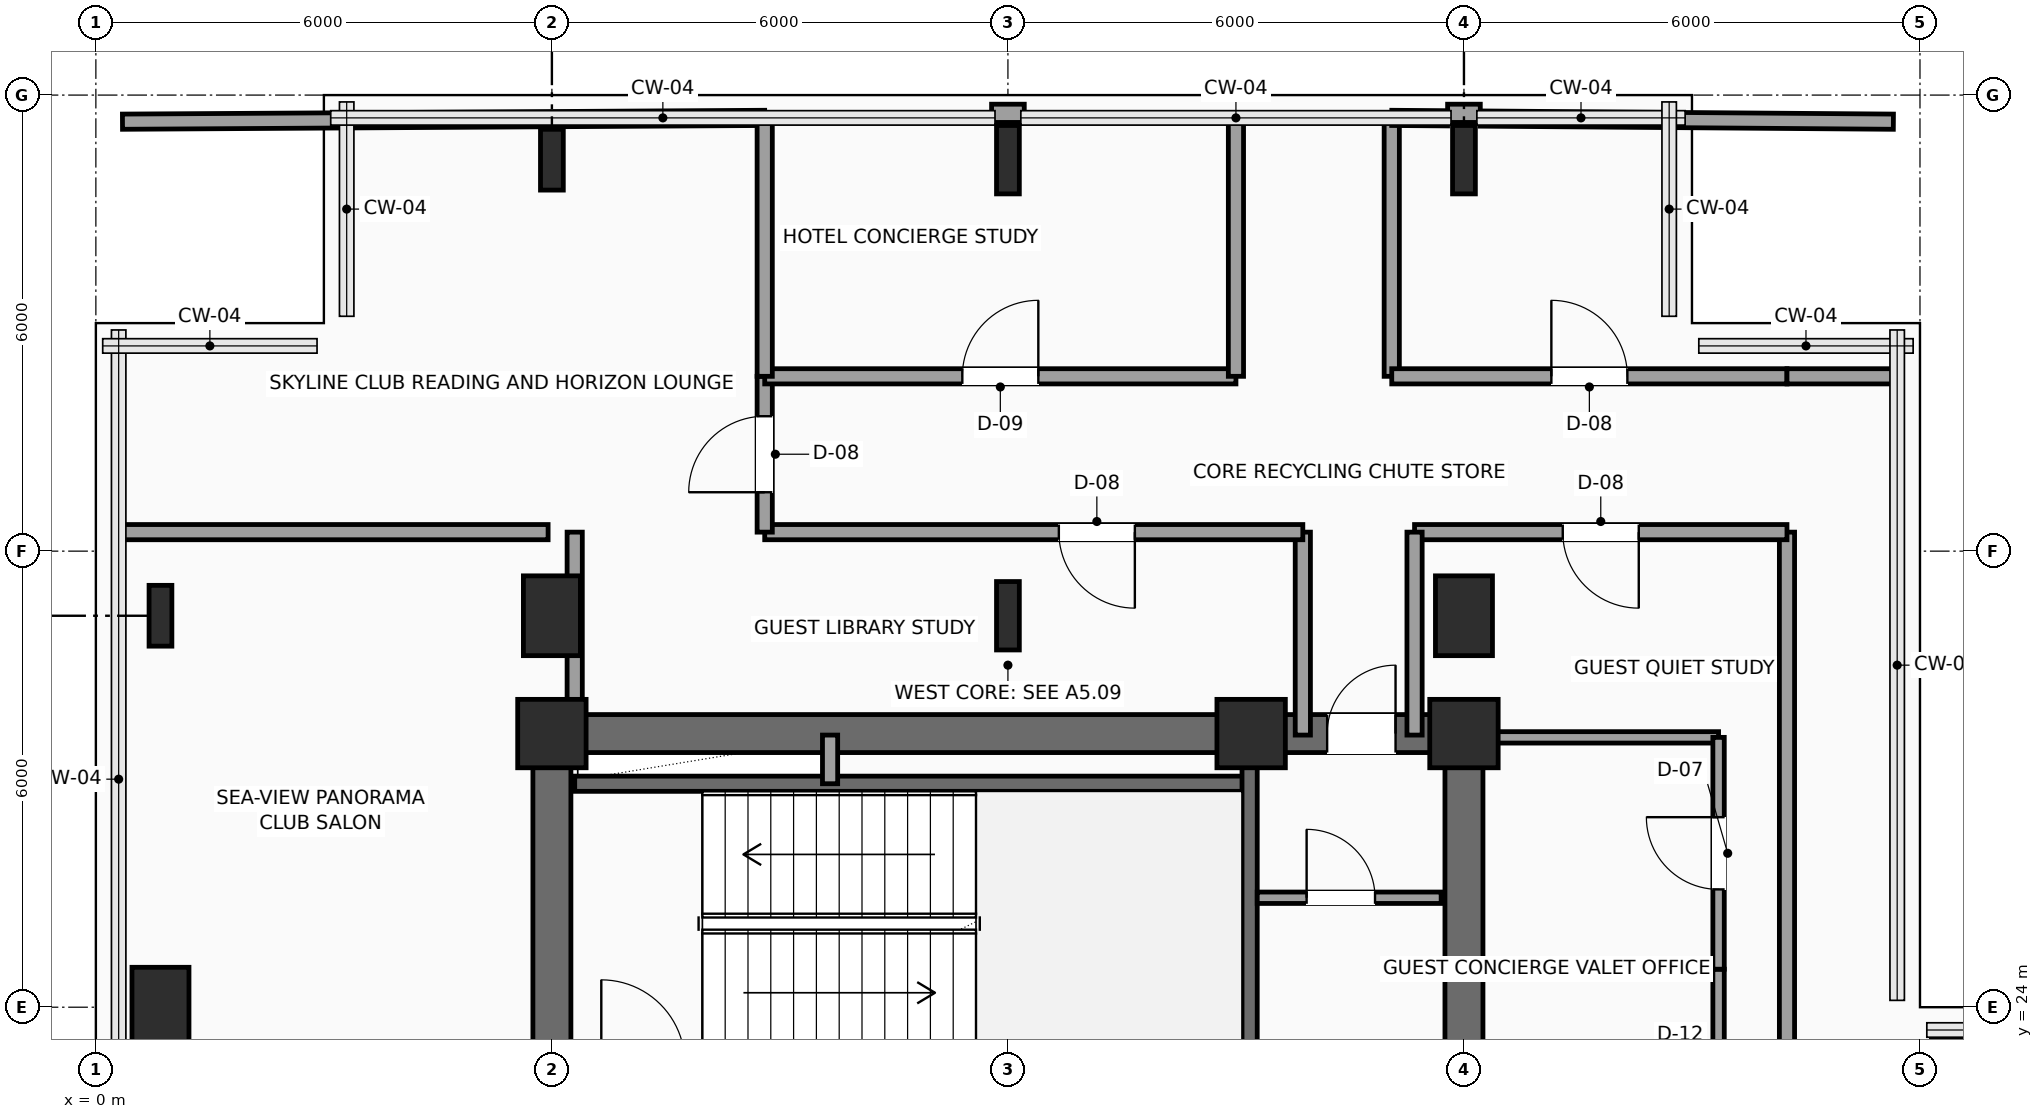
"""IFC4 building model, lengths in metres.
Left out: names, types, materials, properties, quantities, classifications, styles, units other than length and angle.
Written with IfcOpenShell. Run it as: python <this file> out.ifc"""

import sys

from ifc_helpers import new_model, si_unit, direction, frame, frame_2d, origin, origin_2d, place, context, subcontext, project, spatial, rectangle, i_section, extrude, element, fill, save


model = new_model("IFC4")
c1 = context("Model", 3, precision=1e-05, world=origin(), true_north=direction((0.0, 1.0)))
c2 = subcontext(c1, "Body", "Model", "MODEL_VIEW")
j1 = project(units=[si_unit("LENGTHUNIT", "METRE"), si_unit("PLANEANGLEUNIT", "RADIAN")], contexts=[c1])
p1 = place(None, origin())
s1 = spatial("IfcSite", under=j1, at=p1, CompositionType="ELEMENT")
p2 = place(p1, origin())
s2 = spatial("IfcBuilding", under=s1, at=p2, CompositionType="ELEMENT")
p3 = place(p2, frame((0.0, 0.0, 172.95)))
s3 = spatial("IfcBuildingStorey", under=s2, at=p3, CompositionType="ELEMENT", Elevation=172.95)
for number, where, z_axis, x_axis in (
    (1, (6.0, 27.6, 0.0), (0.0, 0.0, 1.0), (1.0, 0.0, 0.0)),
    (2, (15.2, 27.6, 0.0), (0.0, 0.0, 1.0), (1.0, 0.0, 0.0)),
    (3, (18.0, 27.6, 0.0), (0.0, 0.0, 1.0), (1.0, 0.0, 0.0)),
):
    element("IfcColumn", number, at=place(p3, frame(where, z_axis=z_axis, x_axis=x_axis)), inside=s3, PredefinedType="COLUMN", context=c2, shape_type="SweptSolid", body=[
        extrude(rectangle(XDim=0.9, YDim=0.9, at=origin_2d()), origin(), (0.0, 0.0, 1.0), 3.75),
    ])
p4 = place(p3, frame((0.85, 24.0, 0.0), z_axis=(0.0, 0.0, 1.0), x_axis=(1.0, 0.0, 0.0)))
e4 = element("IfcColumn", 4, at=p4, inside=s3, PredefinedType="COLUMN", context=c2, shape_type="SweptSolid", body=[
    extrude(rectangle(XDim=0.75, YDim=1.05, at=origin_2d()), origin(), (0.0, 0.0, 1.0), 3.75),
])
p5 = place(p3, frame((0.85, 29.15, 0.0), z_axis=(0.0, 0.0, 1.0), x_axis=(1.0, 0.0, 0.0)))
e5 = element("IfcColumn", 5, at=p5, inside=s3, PredefinedType="COLUMN", context=c2, shape_type="SweptSolid", body=[
    extrude(i_section(OverallWidth=0.3, OverallDepth=0.8, WebThickness=0.018, FlangeThickness=0.033, FilletRadius=0.03, at=origin_2d()), origin(), (0.0, 0.0, 1.0), 3.75),
])
p6 = place(p3, frame((6.0, 29.15, 0.0), z_axis=(0.0, 0.0, 1.0), x_axis=(1.0, 0.0, 0.0)))
e6 = element("IfcColumn", 6, at=p6, inside=s3, PredefinedType="COLUMN", context=c2, shape_type="SweptSolid", body=[
    extrude(rectangle(XDim=0.75, YDim=1.05, at=origin_2d()), origin(), (0.0, 0.0, 1.0), 3.75),
])
p7 = place(p3, frame((6.0, 35.15, 0.0), z_axis=(0.0, 0.0, 1.0), x_axis=(1.0, 0.0, 0.0)))
e7 = element("IfcColumn", 7, at=p7, inside=s3, PredefinedType="COLUMN", context=c2, shape_type="SweptSolid", body=[
    extrude(i_section(OverallWidth=0.3, OverallDepth=0.8, WebThickness=0.018, FlangeThickness=0.033, FilletRadius=0.03, at=origin_2d()), origin(), (0.0, 0.0, 1.0), 3.75),
])
for number, where, z_axis, x_axis in (
    (8, (12.0, 29.15, 0.0), (0.0, 0.0, 1.0), (1.0, 0.0, 0.0)),
    (9, (12.0, 35.15, 0.0), (0.0, 0.0, 1.0), (1.0, 0.0, 0.0)),
):
    element("IfcColumn", number, at=place(p3, frame(where, z_axis=z_axis, x_axis=x_axis)), inside=s3, PredefinedType="COLUMN", context=c2, shape_type="SweptSolid", body=[
        extrude(i_section(OverallWidth=0.3, OverallDepth=0.9, WebThickness=0.019, FlangeThickness=0.035, FilletRadius=0.03, at=origin_2d()), origin(), (0.0, 0.0, 1.0), 3.75),
    ])
p8 = place(p3, frame((18.0, 29.15, 0.0), z_axis=(0.0, 0.0, 1.0), x_axis=(1.0, 0.0, 0.0)))
e10 = element("IfcColumn", 10, at=p8, inside=s3, PredefinedType="COLUMN", context=c2, shape_type="SweptSolid", body=[
    extrude(rectangle(XDim=0.75, YDim=1.05, at=origin_2d()), origin(), (0.0, 0.0, 1.0), 3.75),
])
p9 = place(p3, frame((18.0, 35.15, 0.0), z_axis=(0.0, 0.0, 1.0), x_axis=(1.0, 0.0, 0.0)))
e11 = element("IfcColumn", 11, at=p9, inside=s3, PredefinedType="COLUMN", context=c2, shape_type="SweptSolid", body=[
    extrude(i_section(OverallWidth=0.3, OverallDepth=0.9, WebThickness=0.019, FlangeThickness=0.035, FilletRadius=0.03, at=origin_2d()), origin(), (0.0, 0.0, 1.0), 3.75),
])
for number, where, z_axis, x_axis in (
    (12, (11.785, 35.76, 0.0), (0.0, 0.0, 1.0), (1.0, 0.0, 0.0)),
    (13, (17.785, 35.76, 0.0), (0.0, 0.0, 1.0), (1.0, 0.0, 0.0)),
):
    element("IfcWall", number, at=place(p3, frame(where, z_axis=z_axis, x_axis=x_axis)), inside=s3, PredefinedType="SOLIDWALL", context=c2, shape_type="SweptSolid", body=[
        extrude(rectangle(XDim=0.43, YDim=0.24, at=frame_2d((0.215, 0.0))), origin(), (0.0, 0.0, 1.0), 3.54),
    ])
p10 = place(p3, frame((6.0, 27.6, 0.0), z_axis=(0.0, 0.0, 1.0), x_axis=(1.0, 0.0, 0.0)))
e14 = element("IfcWall", 14, at=p10, inside=s3, PredefinedType="SHEAR", context=c2, shape_type="SweptSolid", body=[
    extrude(rectangle(XDim=12.0, YDim=0.5, at=frame_2d((6.0, 0.0))), origin(), (0.0, 0.0, 1.0), 3.54),
])
p11 = place(p10, frame((10.2, 0.0, 0.0)))
e15 = element("IfcOpeningElement", 15, at=p11, cuts=e14, PredefinedType="OPENING", context=c2, shape_type="SweptSolid", body=[
    extrude(rectangle(XDim=0.9, YDim=2.15, at=frame_2d((0.45, 1.075))), frame((0.0, 0.26, 0.0), z_axis=(0.0, -1.0, 0.0), x_axis=(1.0, 0.0, 0.0)), (0.0, 0.0, 1.0), 0.52),
])
for number, where, z_axis, x_axis in (
    (16, (6.0, 18.0, 0.0), (0.0, 0.0, 1.0), (0.0, 1.0, 0.0)),
    (17, (18.0, 18.0, 0.0), (0.0, 0.0, 1.0), (0.0, 1.0, 0.0)),
):
    element("IfcWall", number, at=place(p3, frame(where, z_axis=z_axis, x_axis=x_axis)), inside=s3, PredefinedType="SHEAR", context=c2, shape_type="SweptSolid", body=[
        extrude(rectangle(XDim=9.6, YDim=0.5, at=frame_2d((4.8, 0.0))), origin(), (0.0, 0.0, 1.0), 3.54),
    ])
p12 = place(p3, frame((6.3, 26.94, 0.0), z_axis=(0.0, 0.0, 1.0), x_axis=(1.0, 0.0, 0.0)))
e18 = element("IfcWall", 18, at=p12, inside=s3, PredefinedType="SHEAR", context=c2, shape_type="SweptSolid", body=[
    extrude(rectangle(XDim=8.88, YDim=0.2, at=frame_2d((4.44, 0.0))), origin(), (0.0, 0.0, 1.0), 3.54),
])
p13 = place(p3, frame((15.18, 23.26, 0.0), z_axis=(0.0, 0.0, 1.0), x_axis=(0.0, 1.0, 0.0)))
e19 = element("IfcWall", 19, at=p13, inside=s3, PredefinedType="SHEAR", context=c2, shape_type="SweptSolid", body=[
    extrude(rectangle(XDim=4.04, YDim=0.2, at=frame_2d((2.02, 0.0))), origin(), (0.0, 0.0, 1.0), 3.54),
])
p14 = place(p3, frame((9.66, 26.94, 0.0), z_axis=(0.0, 0.0, 1.0), x_axis=(0.0, 1.0, 0.0)))
e20 = element("IfcWall", 20, at=p14, inside=s3, PredefinedType="SOLIDWALL", context=c2, shape_type="SweptSolid", body=[
    extrude(rectangle(XDim=0.64, YDim=0.2, at=frame_2d((0.32, 0.0))), origin(), (0.0, 0.0, 1.0), 3.54),
])
p15 = place(p3, frame((15.28, 25.44, 0.0), z_axis=(0.0, 0.0, 1.0), x_axis=(1.0, 0.0, 0.0)))
e21 = element("IfcWall", 21, at=p15, inside=s3, PredefinedType="PARTITIONING", context=c2, shape_type="SweptSolid", body=[
    extrude(rectangle(XDim=2.42, YDim=0.15, at=frame_2d((1.21, 0.0))), origin(), (0.0, 0.0, 1.0), 3.54),
])
p16 = place(p15, frame((0.65, 0.0, 0.0)))
e22 = element("IfcOpeningElement", 22, at=p16, cuts=e21, PredefinedType="OPENING", context=c2, shape_type="SweptSolid", body=[
    extrude(rectangle(XDim=0.9, YDim=2.15, at=frame_2d((0.45, 1.075))), frame((0.0, 0.085, 0.0), z_axis=(0.0, -1.0, 0.0), x_axis=(1.0, 0.0, 0.0)), (0.0, 0.0, 1.0), 0.17),
])
p17 = place(p3, frame((24.15, 23.5, 0.0), z_axis=(0.0, 0.0, 1.0), x_axis=(1.0, 0.0, 0.0)))
e23 = element("IfcWall", 23, at=p17, inside=s3, PredefinedType="SHEAR", context=c2, shape_type="SweptSolid", body=[
    extrude(rectangle(XDim=9.15, YDim=0.2, at=frame_2d((4.575, 0.0))), origin(), (0.0, 0.0, 1.0), 3.54),
])
p18 = place(p3, frame((22.25, 11.05, 0.0), z_axis=(0.0, 0.0, 1.0), x_axis=(0.0, 1.0, 0.0)))
e24 = element("IfcWall", 24, at=p18, inside=s3, PredefinedType="PARTITIONING", context=c2, shape_type="SweptSolid", body=[
    extrude(rectangle(XDim=19.2, YDim=0.2, at=frame_2d((9.6, 0.0))), origin(), (0.0, 0.0, 1.0), 3.54),
])
p19 = place(p3, frame((22.25, 30.25, 0.0), z_axis=(0.0, 0.0, 1.0), x_axis=(-1.0, 0.0, 0.0)))
e25 = element("IfcWall", 25, at=p19, inside=s3, PredefinedType="PARTITIONING", context=c2, shape_type="SweptSolid", body=[
    extrude(rectangle(XDim=4.9, YDim=0.2, at=frame_2d((2.45, 0.0))), origin(), (0.0, 0.0, 1.0), 3.54),
])
p20 = place(p19, frame((1.95, 0.0, 0.0)))
e26 = element("IfcOpeningElement", 26, at=p20, cuts=e25, PredefinedType="OPENING", context=c2, shape_type="SweptSolid", body=[
    extrude(rectangle(XDim=1.0, YDim=2.2, at=frame_2d((0.5, 1.1))), frame((0.0, 0.11, 0.0), z_axis=(0.0, -1.0, 0.0), x_axis=(1.0, 0.0, 0.0)), (0.0, 0.0, 1.0), 0.22),
])
for number, where, z_axis, x_axis in (
    (27, (17.35, 30.25, 0.0), (0.0, 0.0, 1.0), (0.0, -1.0, 0.0)),
    (28, (15.88, 27.58, 0.0), (0.0, 0.0, 1.0), (0.0, 1.0, 0.0)),
):
    element("IfcWall", number, at=place(p3, frame(where, z_axis=z_axis, x_axis=x_axis)), inside=s3, PredefinedType="PARTITIONING", context=c2, shape_type="SweptSolid", body=[
        extrude(rectangle(XDim=2.67, YDim=0.2, at=frame_2d((1.335, 0.0))), origin(), (0.0, 0.0, 1.0), 3.54),
    ])
p21 = place(p3, frame((15.88, 30.25, 0.0), z_axis=(0.0, 0.0, 1.0), x_axis=(-1.0, 0.0, 0.0)))
e29 = element("IfcWall", 29, at=p21, inside=s3, PredefinedType="PARTITIONING", context=c2, shape_type="SweptSolid", body=[
    extrude(rectangle(XDim=7.08, YDim=0.2, at=frame_2d((3.54, 0.0))), origin(), (0.0, 0.0, 1.0), 3.54),
])
p22 = place(p21, frame((2.21, 0.0, 0.0)))
e30 = element("IfcOpeningElement", 30, at=p22, cuts=e29, PredefinedType="OPENING", context=c2, shape_type="SweptSolid", body=[
    extrude(rectangle(XDim=1.0, YDim=2.2, at=frame_2d((0.5, 1.1))), frame((0.0, 0.11, 0.0), z_axis=(0.0, -1.0, 0.0), x_axis=(1.0, 0.0, 0.0)), (0.0, 0.0, 1.0), 0.22),
])
p23 = place(p3, frame((8.8, 30.25, 0.0), z_axis=(0.0, 0.0, 1.0), x_axis=(0.0, 1.0, 0.0)))
e31 = element("IfcWall", 31, at=p23, inside=s3, PredefinedType="PARTITIONING", context=c2, shape_type="SweptSolid", body=[
    extrude(rectangle(XDim=2.05, YDim=0.2, at=frame_2d((1.025, 0.0))), origin(), (0.0, 0.0, 1.0), 3.54),
])
p24 = place(p23, frame((0.525, 0.0, 0.0)))
e32 = element("IfcOpeningElement", 32, at=p24, cuts=e31, PredefinedType="OPENING", context=c2, shape_type="SweptSolid", body=[
    extrude(rectangle(XDim=1.0, YDim=2.2, at=frame_2d((0.5, 1.1))), frame((0.0, 0.11, 0.0), z_axis=(0.0, -1.0, 0.0), x_axis=(1.0, 0.0, 0.0)), (0.0, 0.0, 1.0), 0.22),
])
p25 = place(p3, frame((8.8, 32.3, 0.0), z_axis=(0.0, 0.0, 1.0), x_axis=(1.0, 0.0, 0.0)))
e33 = element("IfcWall", 33, at=p25, inside=s3, PredefinedType="PARTITIONING", context=c2, shape_type="SweptSolid", body=[
    extrude(rectangle(XDim=6.2, YDim=0.2, at=frame_2d((3.1, 0.0))), origin(), (0.0, 0.0, 1.0), 3.132),
])
p26 = place(p25, frame((2.6, 0.0, 0.0)))
e34 = element("IfcOpeningElement", 34, at=p26, cuts=e33, PredefinedType="OPENING", context=c2, shape_type="SweptSolid", body=[
    extrude(rectangle(XDim=1.0, YDim=2.2, at=frame_2d((0.5, 1.1))), frame((0.0, 0.11, 0.0), z_axis=(0.0, -1.0, 0.0), x_axis=(1.0, 0.0, 0.0)), (0.0, 0.0, 1.0), 0.22),
])
for number, where, z_axis, x_axis in (
    (35, (15.0, 32.3, 0.0), (0.0, 0.0, 1.0), (0.0, 1.0, 0.0)),
    (36, (17.05, 35.7, 0.0), (0.0, 0.0, 1.0), (0.0, -1.0, 0.0)),
):
    element("IfcWall", number, at=place(p3, frame(where, z_axis=z_axis, x_axis=x_axis)), inside=s3, PredefinedType="PARTITIONING", context=c2, shape_type="SweptSolid", body=[
        extrude(rectangle(XDim=3.4, YDim=0.2, at=frame_2d((1.7, 0.0))), origin(), (0.0, 0.0, 1.0), 3.54),
    ])
p27 = place(p3, frame((17.05, 32.3, 0.0), z_axis=(0.0, 0.0, 1.0), x_axis=(1.0, 0.0, 0.0)))
e37 = element("IfcWall", 37, at=p27, inside=s3, PredefinedType="PARTITIONING", context=c2, shape_type="SweptSolid", body=[
    extrude(rectangle(XDim=5.2, YDim=0.2, at=frame_2d((2.6, 0.0))), origin(), (0.0, 0.0, 1.0), 3.132),
])
p28 = place(p27, frame((2.1, 0.0, 0.0)))
e38 = element("IfcOpeningElement", 38, at=p28, cuts=e37, PredefinedType="OPENING", context=c2, shape_type="SweptSolid", body=[
    extrude(rectangle(XDim=1.0, YDim=2.2, at=frame_2d((0.5, 1.1))), frame((0.0, 0.11, 0.0), z_axis=(0.0, -1.0, 0.0), x_axis=(1.0, 0.0, 0.0)), (0.0, 0.0, 1.0), 0.22),
])
p29 = place(p3, frame((22.25, 32.3, 0.0), z_axis=(0.0, 0.0, 1.0), x_axis=(1.0, 0.0, 0.0)))
e39 = element("IfcWall", 39, at=p29, inside=s3, PredefinedType="PARTITIONING", context=c2, shape_type="SweptSolid", body=[
    extrude(rectangle(XDim=1.45, YDim=0.2, at=frame_2d((0.725, 0.0))), origin(), (0.0, 0.0, 1.0), 3.54),
])
p30 = place(p3, frame((18.1, 24.5, 0.0), z_axis=(0.0, 0.0, 1.0), x_axis=(1.0, 0.0, 0.0)))
e40 = element("IfcWall", 40, at=p30, inside=s3, PredefinedType="PARTITIONING", context=c2, shape_type="SweptSolid", body=[
    extrude(rectangle(XDim=3.25, YDim=0.15, at=frame_2d((1.625, 0.0))), origin(), (0.0, 0.0, 1.0), 3.54),
])
p31 = place(p3, frame((21.35, 20.6, 0.0), z_axis=(0.0, 0.0, 1.0), x_axis=(0.0, 1.0, 0.0)))
e41 = element("IfcWall", 41, at=p31, inside=s3, PredefinedType="PARTITIONING", context=c2, shape_type="SweptSolid", body=[
    extrude(rectangle(XDim=3.9, YDim=0.15, at=frame_2d((1.95, 0.0))), origin(), (0.0, 0.0, 1.0), 3.54),
])
p32 = place(p31, frame((1.5, 0.0, 0.0)))
e42 = element("IfcOpeningElement", 42, at=p32, cuts=e41, PredefinedType="OPENING", context=c2, shape_type="SweptSolid", body=[
    extrude(rectangle(XDim=0.9, YDim=2.1, at=frame_2d((0.45, 1.05))), frame((0.0, 0.085, 0.0), z_axis=(0.0, -1.0, 0.0), x_axis=(1.0, 0.0, 0.0)), (0.0, 0.0, 1.0), 0.17),
])
p33 = place(p3, frame((18.1, 27.55, 0.0), z_axis=(0.0, 0.0, 1.0), x_axis=(1.0, 0.0, 0.0)))
e43 = element("IfcWall", 43, at=p33, inside=s3, PredefinedType="PARTITIONING", context=c2, shape_type="SweptSolid", body=[
    extrude(rectangle(XDim=3.25, YDim=0.15, at=frame_2d((1.625, 0.0))), origin(), (0.0, 0.0, 1.0), 3.54),
])
p34 = place(p3, frame((21.35, 24.5, 0.0), z_axis=(0.0, 0.0, 1.0), x_axis=(0.0, 1.0, 0.0)))
e44 = element("IfcWall", 44, at=p34, inside=s3, PredefinedType="PARTITIONING", context=c2, shape_type="SweptSolid", body=[
    extrude(rectangle(XDim=3.05, YDim=0.15, at=frame_2d((1.525, 0.0))), origin(), (0.0, 0.0, 1.0), 3.54),
])
p35 = place(p34, frame((1.05, 0.0, 0.0)))
e45 = element("IfcOpeningElement", 45, at=p35, cuts=e44, PredefinedType="OPENING", context=c2, shape_type="SweptSolid", body=[
    extrude(rectangle(XDim=0.95, YDim=2.15, at=frame_2d((0.475, 1.075))), frame((0.0, 0.085, 0.0), z_axis=(0.0, -1.0, 0.0), x_axis=(1.0, 0.0, 0.0)), (0.0, 0.0, 1.0), 0.17),
])
p36 = place(p3, frame((0.3, 30.25, 0.0), z_axis=(0.0, 0.0, 1.0), x_axis=(1.0, 0.0, 0.0)))
e46 = element("IfcWall", 46, at=p36, inside=s3, PredefinedType="PARTITIONING", context=c2, shape_type="SweptSolid", body=[
    extrude(rectangle(XDim=5.65, YDim=0.2, at=frame_2d((2.825, 0.0))), origin(), (0.0, 0.0, 1.0), 3.54),
])
p37 = place(p3, frame((6.3, 27.65, 0.0), z_axis=(0.0, 0.0, 1.0), x_axis=(0.0, 1.0, 0.0)))
e47 = element("IfcWall", 47, at=p37, inside=s3, PredefinedType="PARTITIONING", context=c2, shape_type="SweptSolid", body=[
    extrude(rectangle(XDim=2.6, YDim=0.2, at=frame_2d((1.3, 0.0))), origin(), (0.0, 0.0, 1.0), 3.132),
])
p38 = place(p3, frame((0.35, 35.65, 0.0), z_axis=(0.0, 0.0, 1.0), x_axis=(0.99998245966, 0.005922868574, 0.0)))
e48 = element("IfcWall", 48, at=p38, inside=s3, PredefinedType="PARTITIONING", context=c2, shape_type="SweptSolid", body=[
    extrude(rectangle(XDim=8.45, YDim=0.2, at=frame_2d((4.225, 0.0))), origin(), (0.0, 0.0, 1.0), 3.54),
])
p39 = place(p3, frame((8.8, 32.3, 0.0), z_axis=(0.0, 0.0, 1.0), x_axis=(0.0, 1.0, 0.0)))
e49 = element("IfcWall", 49, at=p39, inside=s3, PredefinedType="PARTITIONING", context=c2, shape_type="SweptSolid", body=[
    extrude(rectangle(XDim=3.4, YDim=0.2, at=frame_2d((1.7, 0.0))), origin(), (0.0, 0.0, 1.0), 3.54),
])
p40 = place(p3, frame((17.05, 35.7, 0.0), z_axis=(0.0, 0.0, 1.0), x_axis=(0.99997080734, -0.007640972946, 0.0)))
e50 = element("IfcWall", 50, at=p40, inside=s3, PredefinedType="PARTITIONING", context=c2, shape_type="SweptSolid", body=[
    extrude(rectangle(XDim=0.735, YDim=0.2, at=frame_2d((0.367, 0.0))), origin(), (0.0, 0.0, 1.0), 3.54),
])
p41 = place(p3, frame((18.215, 35.691, 0.0), z_axis=(0.0, 0.0, 1.0), x_axis=(0.999971183893, -0.007591533627, 0.0)))
e51 = element("IfcWall", 51, at=p41, inside=s3, PredefinedType="PARTITIONING", context=c2, shape_type="SweptSolid", body=[
    extrude(rectangle(XDim=5.435, YDim=0.2, at=frame_2d((2.718, 0.0))), origin(), (0.0, 0.0, 1.0), 3.54),
])
p42 = place(p11, origin())
e52 = element("IfcDoor", 52, at=p42, inside=s3, OperationType="SINGLE_SWING_RIGHT", PredefinedType="DOOR", context=c2, shape_type="SweptSolid", body=[
    extrude(rectangle(XDim=0.9, YDim=2.15, at=frame_2d((0.45, 1.075))), frame((0.0, 0.025, 0.0), z_axis=(0.0, -1.0, 0.0), x_axis=(1.0, 0.0, 0.0)), (0.0, 0.0, 1.0), 0.05),
])
fill(e15, e52)
p43 = place(p16, origin())
e53 = element("IfcDoor", 53, at=p43, inside=s3, OperationType="SINGLE_SWING_LEFT", PredefinedType="DOOR", context=c2, shape_type="SweptSolid", body=[
    extrude(rectangle(XDim=0.9, YDim=2.15, at=frame_2d((0.45, 1.075))), frame((0.0, 0.025, 0.0), z_axis=(0.0, -1.0, 0.0), x_axis=(1.0, 0.0, 0.0)), (0.0, 0.0, 1.0), 0.05),
])
fill(e22, e53)
p44 = place(p20, origin())
e54 = element("IfcDoor", 54, at=p44, inside=s3, OperationType="SINGLE_SWING_LEFT", PredefinedType="DOOR", context=c2, shape_type="SweptSolid", body=[
    extrude(rectangle(XDim=1.0, YDim=2.2, at=frame_2d((0.5, 1.1))), frame((0.0, 0.025, 0.0), z_axis=(0.0, -1.0, 0.0), x_axis=(1.0, 0.0, 0.0)), (0.0, 0.0, 1.0), 0.05),
])
fill(e26, e54)
p45 = place(p22, origin())
e55 = element("IfcDoor", 55, at=p45, inside=s3, OperationType="SINGLE_SWING_LEFT", PredefinedType="DOOR", context=c2, shape_type="SweptSolid", body=[
    extrude(rectangle(XDim=1.0, YDim=2.2, at=frame_2d((0.5, 1.1))), frame((0.0, 0.025, 0.0), z_axis=(0.0, -1.0, 0.0), x_axis=(1.0, 0.0, 0.0)), (0.0, 0.0, 1.0), 0.05),
])
fill(e30, e55)
p46 = place(p24, origin())
e56 = element("IfcDoor", 56, at=p46, inside=s3, OperationType="SINGLE_SWING_LEFT", PredefinedType="DOOR", context=c2, shape_type="SweptSolid", body=[
    extrude(rectangle(XDim=1.0, YDim=2.2, at=frame_2d((0.5, 1.1))), frame((0.0, 0.025, 0.0), z_axis=(0.0, -1.0, 0.0), x_axis=(1.0, 0.0, 0.0)), (0.0, 0.0, 1.0), 0.05),
])
fill(e32, e56)
p47 = place(p26, origin())
e57 = element("IfcDoor", 57, at=p47, inside=s3, OperationType="SINGLE_SWING_RIGHT", PredefinedType="DOOR", context=c2, shape_type="SweptSolid", body=[
    extrude(rectangle(XDim=1.0, YDim=2.2, at=frame_2d((0.5, 1.1))), frame((0.0, 0.025, 0.0), z_axis=(0.0, -1.0, 0.0), x_axis=(1.0, 0.0, 0.0)), (0.0, 0.0, 1.0), 0.05),
])
fill(e34, e57)
p48 = place(p28, origin())
e58 = element("IfcDoor", 58, at=p48, inside=s3, OperationType="SINGLE_SWING_LEFT", PredefinedType="DOOR", context=c2, shape_type="SweptSolid", body=[
    extrude(rectangle(XDim=1.0, YDim=2.2, at=frame_2d((0.5, 1.1))), frame((0.0, 0.025, 0.0), z_axis=(0.0, -1.0, 0.0), x_axis=(1.0, 0.0, 0.0)), (0.0, 0.0, 1.0), 0.05),
])
fill(e38, e58)
p49 = place(p35, origin())
e59 = element("IfcDoor", 59, at=p49, inside=s3, OperationType="SINGLE_SWING_RIGHT", PredefinedType="DOOR", context=c2, shape_type="SweptSolid", body=[
    extrude(rectangle(XDim=0.95, YDim=2.15, at=frame_2d((0.475, 1.075))), frame((0.0, 0.025, 0.0), z_axis=(0.0, -1.0, 0.0), x_axis=(1.0, 0.0, 0.0)), (0.0, 0.0, 1.0), 0.05),
])
fill(e45, e59)
save(model, sys.argv[1])
